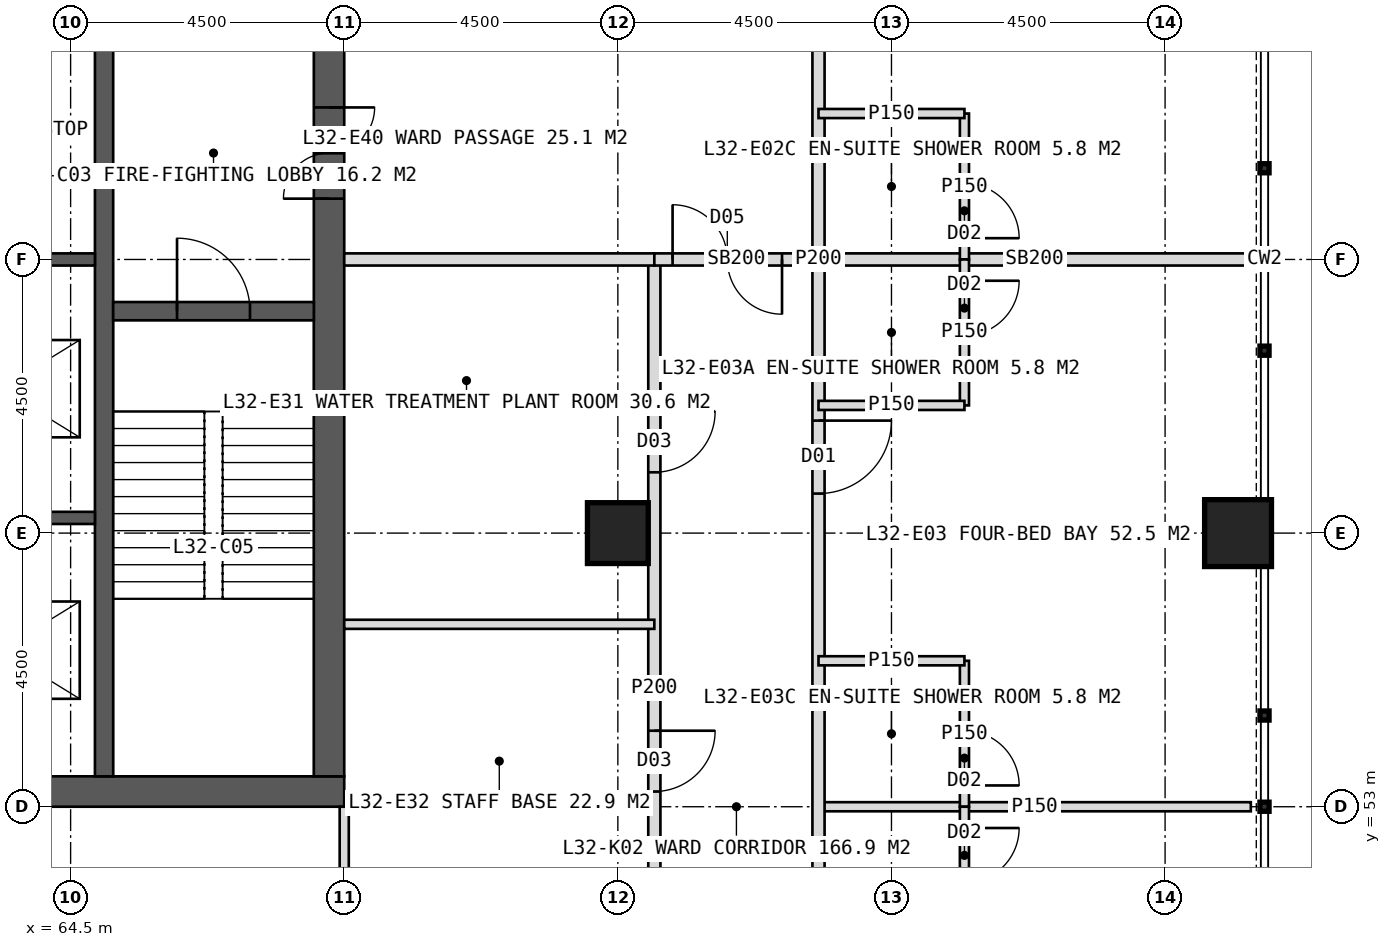
"""IFC4 building model, lengths in metres.
Left out: names, types, materials, properties, quantities, classifications, styles, units other than length and angle.
Written with IfcOpenShell. Run it as: python <this file> out.ifc"""

import sys

from ifc_helpers import new_model, si_unit, direction, frame, frame_2d, origin, origin_2d, place, context, subcontext, project, spatial, rectangle, hollow_rectangle, extrude, element, fill, save


model = new_model("IFC4")
c1 = context("Model", 3, precision=1e-05, world=origin(), true_north=direction((0.0, 1.0)))
c2 = subcontext(c1, "Body", "Model", "MODEL_VIEW")
j1 = project(units=[si_unit("LENGTHUNIT", "METRE"), si_unit("PLANEANGLEUNIT", "RADIAN")], contexts=[c1])
p1 = place(None, origin())
s1 = spatial("IfcSite", under=j1, at=p1, CompositionType="ELEMENT")
p2 = place(p1, origin())
s2 = spatial("IfcBuilding", under=s1, at=p2, CompositionType="ELEMENT")
p3 = place(p2, frame((0.0, 0.0, 136.0)))
s3 = spatial("IfcBuildingStorey", under=s2, at=p3, CompositionType="ELEMENT", Elevation=136.0)
p4 = place(p3, frame((51.0, 53.25, 0.0), z_axis=(0.0, 0.0, 1.0), x_axis=(1.0, 0.0, 0.0)))
e1 = element("IfcWall", 1, at=p4, inside=s3, PredefinedType="SHEAR", context=c2, shape_type="SweptSolid", body=[
    extrude(rectangle(XDim=18.0, YDim=0.5, at=frame_2d((9.0, 0.0))), origin(), (0.0, 0.0, 1.0), 4.0),
])
p5 = place(p4, frame((8.1, 0.0, 0.0)))
e2 = element("IfcOpeningElement", 2, at=p5, cuts=e1, PredefinedType="OPENING", context=c2, shape_type="SweptSolid", body=[
    extrude(rectangle(XDim=1.8, YDim=2.2, at=frame_2d((0.9, 1.1))), frame((0.0, 0.26, 0.0), z_axis=(0.0, -1.0, 0.0), x_axis=(1.0, 0.0, 0.0)), (0.0, 0.0, 1.0), 0.52),
])
p6 = place(p3, frame((68.75, 53.5, 0.0), z_axis=(0.0, 0.0, 1.0), x_axis=(0.0, 1.0, 0.0)))
e3 = element("IfcWall", 3, at=p6, inside=s3, PredefinedType="SHEAR", context=c2, shape_type="SweptSolid", body=[
    extrude(rectangle(XDim=17.0, YDim=0.5, at=frame_2d((8.5, 0.0))), origin(), (0.0, 0.0, 1.0), 4.0),
])
p7 = place(p6, frame((9.5, 0.0, 0.0)))
e4 = element("IfcOpeningElement", 4, at=p7, cuts=e3, PredefinedType="OPENING", context=c2, shape_type="SweptSolid", body=[
    extrude(rectangle(XDim=1.5, YDim=2.2, at=frame_2d((0.75, 1.1))), frame((0.0, 0.26, 0.0), z_axis=(0.0, -1.0, 0.0), x_axis=(1.0, 0.0, 0.0)), (0.0, 0.0, 1.0), 0.52),
])
p8 = place(p3, frame((65.05, 53.5, 0.0), z_axis=(0.0, 0.0, 1.0), x_axis=(0.0, 1.0, 0.0)))
e5 = element("IfcWall", 5, at=p8, inside=s3, PredefinedType="SHEAR", context=c2, shape_type="SweptSolid", body=[
    extrude(rectangle(XDim=17.0, YDim=0.3, at=frame_2d((8.5, 0.0))), origin(), (0.0, 0.0, 1.0), 4.0),
])
for number, where, z_axis, x_axis in (
    (6, (61.85, 57.75, 0.0), (0.0, 0.0, 1.0), (1.0, 0.0, 0.0)),
    (7, (61.85, 62.0, 0.0), (0.0, 0.0, 1.0), (1.0, 0.0, 0.0)),
):
    element("IfcWall", number, at=place(p3, frame(where, z_axis=z_axis, x_axis=x_axis)), inside=s3, PredefinedType="SHEAR", context=c2, shape_type="SweptSolid", body=[
        extrude(rectangle(XDim=3.05, YDim=0.2, at=frame_2d((1.525, 0.0))), origin(), (0.0, 0.0, 1.0), 4.0),
    ])
p9 = place(p3, frame((65.2, 61.15, 0.0), z_axis=(0.0, 0.0, 1.0), x_axis=(1.0, 0.0, 0.0)))
e8 = element("IfcWall", 8, at=p9, inside=s3, PredefinedType="SHEAR", context=c2, shape_type="SweptSolid", body=[
    extrude(rectangle(XDim=3.3, YDim=0.3, at=frame_2d((1.65, 0.0))), origin(), (0.0, 0.0, 1.0), 4.0),
])
p10 = place(p9, frame((1.05, 0.0, 0.0)))
e9 = element("IfcOpeningElement", 9, at=p10, cuts=e8, PredefinedType="OPENING", context=c2, shape_type="SweptSolid", body=[
    extrude(rectangle(XDim=1.2, YDim=2.1, at=frame_2d((0.6, 1.05))), frame((0.0, 0.16, 0.0), z_axis=(0.0, -1.0, 0.0), x_axis=(1.0, 0.0, 0.0)), (0.0, 0.0, 1.0), 0.32),
])
p11 = place(p3, frame((73.5, 57.5, 0.0), z_axis=(0.0, 0.0, 1.0), x_axis=(1.0, 0.0, 0.0)))
e10 = element("IfcColumn", 10, at=p11, inside=s3, PredefinedType="COLUMN", context=c2, shape_type="SweptSolid", body=[
    extrude(hollow_rectangle(XDim=1.0, YDim=1.0, WallThickness=0.1, at=origin_2d()), origin(), (0.0, 0.0, 1.0), 4.0),
])
p12 = place(p3, frame((83.7, 57.5, 0.0), z_axis=(0.0, 0.0, 1.0), x_axis=(1.0, 0.0, 0.0)))
e11 = element("IfcColumn", 11, at=p12, inside=s3, PredefinedType="COLUMN", context=c2, shape_type="SweptSolid", body=[
    extrude(hollow_rectangle(XDim=1.1, YDim=1.1, WallThickness=0.1, at=origin_2d()), origin(), (0.0, 0.0, 1.0), 4.0),
])
p13 = place(p3, frame((69.0, 53.0, 0.0), z_axis=(0.0, 0.0, 1.0), x_axis=(0.0, -1.0, 0.0)))
e12 = element("IfcWall", 12, at=p13, inside=s3, PredefinedType="PARTITIONING", context=c2, shape_type="SweptSolid", body=[
    extrude(rectangle(XDim=5.1, YDim=0.15, at=frame_2d((2.55, 0.0))), origin(), (0.0, 0.0, 1.0), 3.75),
])
p14 = place(p3, frame((76.8, 62.0, 0.0), z_axis=(0.0, 0.0, 1.0), x_axis=(1.0, 0.0, 0.0)))
e13 = element("IfcWall", 13, at=p14, inside=s3, PredefinedType="SOLIDWALL", context=c2, shape_type="SweptSolid", body=[
    extrude(rectangle(XDim=7.11, YDim=0.2, at=frame_2d((3.555, 0.0))), origin(), (0.0, 0.0, 1.0), 2.95),
])
p15 = place(p3, frame((76.8, 53.0, 0.0), z_axis=(0.0, 0.0, 1.0), x_axis=(1.0, 0.0, 0.0)))
e14 = element("IfcWall", 14, at=p15, inside=s3, PredefinedType="PARTITIONING", context=c2, shape_type="SweptSolid", body=[
    extrude(rectangle(XDim=7.11, YDim=0.15, at=frame_2d((3.555, 0.0))), origin(), (0.0, 0.0, 1.0), 3.75),
])
p16 = place(p3, frame((76.8, 78.8, 0.0), z_axis=(0.0, 0.0, 1.0), x_axis=(0.0, -1.0, 0.0)))
e15 = element("IfcWall", 15, at=p16, inside=s3, PredefinedType="PARTITIONING", context=c2, shape_type="SweptSolid", body=[
    extrude(rectangle(XDim=33.6, YDim=0.2, at=frame_2d((16.8, 0.0))), origin(), (0.0, 0.0, 1.0), 3.75),
])
p17 = place(p16, frame((2.65, 0.0, 0.0)))
e16 = element("IfcOpeningElement", 16, at=p17, cuts=e15, PredefinedType="OPENING", context=c2, shape_type="SweptSolid", body=[
    extrude(rectangle(XDim=1.2, YDim=2.2, at=frame_2d((0.6, 1.1))), frame((0.0, 0.11, 0.0), z_axis=(0.0, -1.0, 0.0), x_axis=(1.0, 0.0, 0.0)), (0.0, 0.0, 1.0), 0.22),
])
p18 = place(p16, frame((8.95, 0.0, 0.0)))
e17 = element("IfcOpeningElement", 17, at=p18, cuts=e15, PredefinedType="OPENING", context=c2, shape_type="SweptSolid", body=[
    extrude(rectangle(XDim=1.2, YDim=2.2, at=frame_2d((0.6, 1.1))), frame((0.0, 0.11, 0.0), z_axis=(0.0, -1.0, 0.0), x_axis=(1.0, 0.0, 0.0)), (0.0, 0.0, 1.0), 0.22),
])
p19 = place(p16, frame((19.45, 0.0, 0.0)))
e18 = element("IfcOpeningElement", 18, at=p19, cuts=e15, PredefinedType="OPENING", context=c2, shape_type="SweptSolid", body=[
    extrude(rectangle(XDim=1.2, YDim=2.2, at=frame_2d((0.6, 1.1))), frame((0.0, 0.11, 0.0), z_axis=(0.0, -1.0, 0.0), x_axis=(1.0, 0.0, 0.0)), (0.0, 0.0, 1.0), 0.22),
])
p20 = place(p16, frame((28.45, 0.0, 0.0)))
e19 = element("IfcOpeningElement", 19, at=p20, cuts=e15, PredefinedType="OPENING", context=c2, shape_type="SweptSolid", body=[
    extrude(rectangle(XDim=1.2, YDim=2.2, at=frame_2d((0.6, 1.1))), frame((0.0, 0.11, 0.0), z_axis=(0.0, -1.0, 0.0), x_axis=(1.0, 0.0, 0.0)), (0.0, 0.0, 1.0), 0.22),
])
p21 = place(p3, frame((79.2, 64.4, 0.0), z_axis=(0.0, 0.0, 1.0), x_axis=(0.0, -1.0, 0.0)))
e20 = element("IfcWall", 20, at=p21, inside=s3, PredefinedType="PARTITIONING", context=c2, shape_type="SweptSolid", body=[
    extrude(rectangle(XDim=2.4, YDim=0.15, at=frame_2d((1.2, 0.0))), origin(), (0.0, 0.0, 1.0), 3.75),
])
p22 = place(p21, frame((1.15, 0.0, 0.0)))
e21 = element("IfcOpeningElement", 21, at=p22, cuts=e20, PredefinedType="OPENING", context=c2, shape_type="SweptSolid", body=[
    extrude(rectangle(XDim=0.9, YDim=2.1, at=frame_2d((0.45, 1.05))), frame((0.0, 0.085, 0.0), z_axis=(0.0, -1.0, 0.0), x_axis=(1.0, 0.0, 0.0)), (0.0, 0.0, 1.0), 0.17),
])
p23 = place(p3, frame((76.8, 64.4, 0.0), z_axis=(0.0, 0.0, 1.0), x_axis=(1.0, 0.0, 0.0)))
e22 = element("IfcWall", 22, at=p23, inside=s3, PredefinedType="PARTITIONING", context=c2, shape_type="SweptSolid", body=[
    extrude(rectangle(XDim=2.4, YDim=0.15, at=frame_2d((1.2, 0.0))), origin(), (0.0, 0.0, 1.0), 3.75),
])
p24 = place(p3, frame((79.2, 62.0, 0.0), z_axis=(0.0, 0.0, 1.0), x_axis=(0.0, -1.0, 0.0)))
e23 = element("IfcWall", 23, at=p24, inside=s3, PredefinedType="PARTITIONING", context=c2, shape_type="SweptSolid", body=[
    extrude(rectangle(XDim=2.4, YDim=0.15, at=frame_2d((1.2, 0.0))), origin(), (0.0, 0.0, 1.0), 3.75),
])
p25 = place(p24, frame((0.35, 0.0, 0.0)))
e24 = element("IfcOpeningElement", 24, at=p25, cuts=e23, PredefinedType="OPENING", context=c2, shape_type="SweptSolid", body=[
    extrude(rectangle(XDim=0.9, YDim=2.1, at=frame_2d((0.45, 1.05))), frame((0.0, 0.085, 0.0), z_axis=(0.0, -1.0, 0.0), x_axis=(1.0, 0.0, 0.0)), (0.0, 0.0, 1.0), 0.17),
])
p26 = place(p3, frame((76.8, 59.6, 0.0), z_axis=(0.0, 0.0, 1.0), x_axis=(1.0, 0.0, 0.0)))
e25 = element("IfcWall", 25, at=p26, inside=s3, PredefinedType="PARTITIONING", context=c2, shape_type="SweptSolid", body=[
    extrude(rectangle(XDim=2.4, YDim=0.15, at=frame_2d((1.2, 0.0))), origin(), (0.0, 0.0, 1.0), 3.75),
])
p27 = place(p3, frame((79.2, 55.4, 0.0), z_axis=(0.0, 0.0, 1.0), x_axis=(0.0, -1.0, 0.0)))
e26 = element("IfcWall", 26, at=p27, inside=s3, PredefinedType="PARTITIONING", context=c2, shape_type="SweptSolid", body=[
    extrude(rectangle(XDim=2.4, YDim=0.15, at=frame_2d((1.2, 0.0))), origin(), (0.0, 0.0, 1.0), 3.75),
])
p28 = place(p27, frame((1.15, 0.0, 0.0)))
e27 = element("IfcOpeningElement", 27, at=p28, cuts=e26, PredefinedType="OPENING", context=c2, shape_type="SweptSolid", body=[
    extrude(rectangle(XDim=0.9, YDim=2.1, at=frame_2d((0.45, 1.05))), frame((0.0, 0.085, 0.0), z_axis=(0.0, -1.0, 0.0), x_axis=(1.0, 0.0, 0.0)), (0.0, 0.0, 1.0), 0.17),
])
p29 = place(p3, frame((76.8, 55.4, 0.0), z_axis=(0.0, 0.0, 1.0), x_axis=(1.0, 0.0, 0.0)))
e28 = element("IfcWall", 28, at=p29, inside=s3, PredefinedType="PARTITIONING", context=c2, shape_type="SweptSolid", body=[
    extrude(rectangle(XDim=2.4, YDim=0.15, at=frame_2d((1.2, 0.0))), origin(), (0.0, 0.0, 1.0), 3.75),
])
p30 = place(p3, frame((79.2, 53.0, 0.0), z_axis=(0.0, 0.0, 1.0), x_axis=(0.0, -1.0, 0.0)))
e29 = element("IfcWall", 29, at=p30, inside=s3, PredefinedType="PARTITIONING", context=c2, shape_type="SweptSolid", body=[
    extrude(rectangle(XDim=2.4, YDim=0.15, at=frame_2d((1.2, 0.0))), origin(), (0.0, 0.0, 1.0), 3.75),
])
p31 = place(p30, frame((0.35, 0.0, 0.0)))
e30 = element("IfcOpeningElement", 30, at=p31, cuts=e29, PredefinedType="OPENING", context=c2, shape_type="SweptSolid", body=[
    extrude(rectangle(XDim=0.9, YDim=2.1, at=frame_2d((0.45, 1.05))), frame((0.0, 0.085, 0.0), z_axis=(0.0, -1.0, 0.0), x_axis=(1.0, 0.0, 0.0)), (0.0, 0.0, 1.0), 0.17),
])
p32 = place(p3, frame((74.1, 62.0, 0.0), z_axis=(0.0, 0.0, 1.0), x_axis=(0.0, -1.0, 0.0)))
e31 = element("IfcWall", 31, at=p32, inside=s3, PredefinedType="PARTITIONING", context=c2, shape_type="SweptSolid", body=[
    extrude(rectangle(XDim=14.1, YDim=0.2, at=frame_2d((7.05, 0.0))), origin(), (0.0, 0.0, 1.0), 3.75),
])
p33 = place(p32, frame((2.5, 0.0, 0.0)))
e32 = element("IfcOpeningElement", 32, at=p33, cuts=e31, PredefinedType="OPENING", context=c2, shape_type="SweptSolid", body=[
    extrude(rectangle(XDim=1.0, YDim=2.1, at=frame_2d((0.5, 1.05))), frame((0.0, 0.11, 0.0), z_axis=(0.0, -1.0, 0.0), x_axis=(1.0, 0.0, 0.0)), (0.0, 0.0, 1.0), 0.22),
])
p34 = place(p32, frame((7.75, 0.0, 0.0)))
e33 = element("IfcOpeningElement", 33, at=p34, cuts=e31, PredefinedType="OPENING", context=c2, shape_type="SweptSolid", body=[
    extrude(rectangle(XDim=1.0, YDim=2.1, at=frame_2d((0.5, 1.05))), frame((0.0, 0.11, 0.0), z_axis=(0.0, -1.0, 0.0), x_axis=(1.0, 0.0, 0.0)), (0.0, 0.0, 1.0), 0.22),
])
p35 = place(p32, frame((11.2, 0.0, 0.0)))
e34 = element("IfcOpeningElement", 34, at=p35, cuts=e31, PredefinedType="OPENING", context=c2, shape_type="SweptSolid", body=[
    extrude(rectangle(XDim=1.0, YDim=2.1, at=frame_2d((0.5, 1.05))), frame((0.0, 0.11, 0.0), z_axis=(0.0, -1.0, 0.0), x_axis=(1.0, 0.0, 0.0)), (0.0, 0.0, 1.0), 0.22),
])
p36 = place(p3, frame((69.0, 62.0, 0.0), z_axis=(0.0, 0.0, 1.0), x_axis=(1.0, 0.0, 0.0)))
e35 = element("IfcWall", 35, at=p36, inside=s3, PredefinedType="SOLIDWALL", context=c2, shape_type="SweptSolid", body=[
    extrude(rectangle(XDim=5.1, YDim=0.2, at=frame_2d((2.55, 0.0))), origin(), (0.0, 0.0, 1.0), 2.95),
])
p37 = place(p3, frame((69.0, 56.0, 0.0), z_axis=(0.0, 0.0, 1.0), x_axis=(1.0, 0.0, 0.0)))
e36 = element("IfcWall", 36, at=p37, inside=s3, PredefinedType="PARTITIONING", context=c2, shape_type="SweptSolid", body=[
    extrude(rectangle(XDim=5.1, YDim=0.15, at=frame_2d((2.55, 0.0))), origin(), (0.0, 0.0, 1.0), 3.75),
])
p38 = place(p3, frame((74.1, 62.0, 0.0), z_axis=(0.0, 0.0, 1.0), x_axis=(1.0, 0.0, 0.0)))
e37 = element("IfcWall", 37, at=p38, inside=s3, PredefinedType="SOLIDWALL", context=c2, shape_type="SweptSolid", body=[
    extrude(rectangle(XDim=2.7, YDim=0.2, at=frame_2d((1.35, 0.0))), origin(), (0.0, 0.0, 1.0), 2.95),
])
p39 = place(p38, frame((0.3, 0.0, 0.0)))
e38 = element("IfcOpeningElement", 38, at=p39, cuts=e37, PredefinedType="OPENING", context=c2, shape_type="SweptSolid", body=[
    extrude(rectangle(XDim=1.8, YDim=2.2, at=frame_2d((0.9, 1.1))), frame((0.0, 0.11, 0.0), z_axis=(0.0, -1.0, 0.0), x_axis=(1.0, 0.0, 0.0)), (0.0, 0.0, 1.0), 0.22),
])
p40 = place(p22, origin())
e39 = element("IfcDoor", 39, at=p40, inside=s3, OperationType="SINGLE_SWING_RIGHT", PredefinedType="DOOR", context=c2, shape_type="SweptSolid", body=[
    extrude(rectangle(XDim=0.9, YDim=2.1, at=frame_2d((0.45, 1.05))), frame((0.0, 0.025, 0.0), z_axis=(0.0, -1.0, 0.0), x_axis=(1.0, 0.0, 0.0)), (0.0, 0.0, 1.0), 0.05),
])
fill(e21, e39)
p41 = place(p19, origin())
e40 = element("IfcDoor", 40, at=p41, inside=s3, OperationType="SINGLE_SWING_LEFT", PredefinedType="DOOR", context=c2, shape_type="SweptSolid", body=[
    extrude(rectangle(XDim=1.2, YDim=2.2, at=frame_2d((0.6, 1.1))), frame((0.0, 0.025, 0.0), z_axis=(0.0, -1.0, 0.0), x_axis=(1.0, 0.0, 0.0)), (0.0, 0.0, 1.0), 0.05),
])
fill(e18, e40)
p42 = place(p25, origin())
e41 = element("IfcDoor", 41, at=p42, inside=s3, OperationType="SINGLE_SWING_LEFT", PredefinedType="DOOR", context=c2, shape_type="SweptSolid", body=[
    extrude(rectangle(XDim=0.9, YDim=2.1, at=frame_2d((0.45, 1.05))), frame((0.0, 0.025, 0.0), z_axis=(0.0, -1.0, 0.0), x_axis=(1.0, 0.0, 0.0)), (0.0, 0.0, 1.0), 0.05),
])
fill(e24, e41)
p43 = place(p28, origin())
e42 = element("IfcDoor", 42, at=p43, inside=s3, OperationType="SINGLE_SWING_RIGHT", PredefinedType="DOOR", context=c2, shape_type="SweptSolid", body=[
    extrude(rectangle(XDim=0.9, YDim=2.1, at=frame_2d((0.45, 1.05))), frame((0.0, 0.025, 0.0), z_axis=(0.0, -1.0, 0.0), x_axis=(1.0, 0.0, 0.0)), (0.0, 0.0, 1.0), 0.05),
])
fill(e27, e42)
p44 = place(p31, origin())
e43 = element("IfcDoor", 43, at=p44, inside=s3, OperationType="SINGLE_SWING_LEFT", PredefinedType="DOOR", context=c2, shape_type="SweptSolid", body=[
    extrude(rectangle(XDim=0.9, YDim=2.1, at=frame_2d((0.45, 1.05))), frame((0.0, 0.025, 0.0), z_axis=(0.0, -1.0, 0.0), x_axis=(1.0, 0.0, 0.0)), (0.0, 0.0, 1.0), 0.05),
])
fill(e30, e43)
p45 = place(p33, origin())
e44 = element("IfcDoor", 44, at=p45, inside=s3, OperationType="SINGLE_SWING_LEFT", PredefinedType="DOOR", context=c2, shape_type="SweptSolid", body=[
    extrude(rectangle(XDim=1.0, YDim=2.1, at=frame_2d((0.5, 1.05))), frame((0.0, 0.025, 0.0), z_axis=(0.0, -1.0, 0.0), x_axis=(1.0, 0.0, 0.0)), (0.0, 0.0, 1.0), 0.05),
])
fill(e32, e44)
p46 = place(p34, origin())
e45 = element("IfcDoor", 45, at=p46, inside=s3, OperationType="SINGLE_SWING_LEFT", PredefinedType="DOOR", context=c2, shape_type="SweptSolid", body=[
    extrude(rectangle(XDim=1.0, YDim=2.1, at=frame_2d((0.5, 1.05))), frame((0.0, 0.025, 0.0), z_axis=(0.0, -1.0, 0.0), x_axis=(1.0, 0.0, 0.0)), (0.0, 0.0, 1.0), 0.05),
])
fill(e33, e45)
p47 = place(p39, origin())
e46 = element("IfcDoor", 46, at=p47, inside=s3, OperationType="DOUBLE_DOOR_DOUBLE_SWING", PredefinedType="DOOR", context=c2, shape_type="SweptSolid", body=[
    extrude(rectangle(XDim=1.8, YDim=2.2, at=frame_2d((0.9, 1.1))), frame((0.0, 0.025, 0.0), z_axis=(0.0, -1.0, 0.0), x_axis=(1.0, 0.0, 0.0)), (0.0, 0.0, 1.0), 0.05),
])
fill(e38, e46)
p48 = place(p7, origin())
e47 = element("IfcDoor", 47, at=p48, inside=s3, OperationType="DOUBLE_DOOR_SINGLE_SWING", PredefinedType="DOOR", context=c2, shape_type="SweptSolid", body=[
    extrude(rectangle(XDim=1.5, YDim=2.2, at=frame_2d((0.75, 1.1))), frame((0.0, 0.025, 0.0), z_axis=(0.0, -1.0, 0.0), x_axis=(1.0, 0.0, 0.0)), (0.0, 0.0, 1.0), 0.05),
])
fill(e4, e47)
p49 = place(p10, origin())
e48 = element("IfcDoor", 48, at=p49, inside=s3, OperationType="SINGLE_SWING_LEFT", PredefinedType="DOOR", context=c2, shape_type="SweptSolid", body=[
    extrude(rectangle(XDim=1.2, YDim=2.1, at=frame_2d((0.6, 1.05))), frame((0.0, 0.025, 0.0), z_axis=(0.0, -1.0, 0.0), x_axis=(1.0, 0.0, 0.0)), (0.0, 0.0, 1.0), 0.05),
])
fill(e9, e48)
save(model, sys.argv[1])
